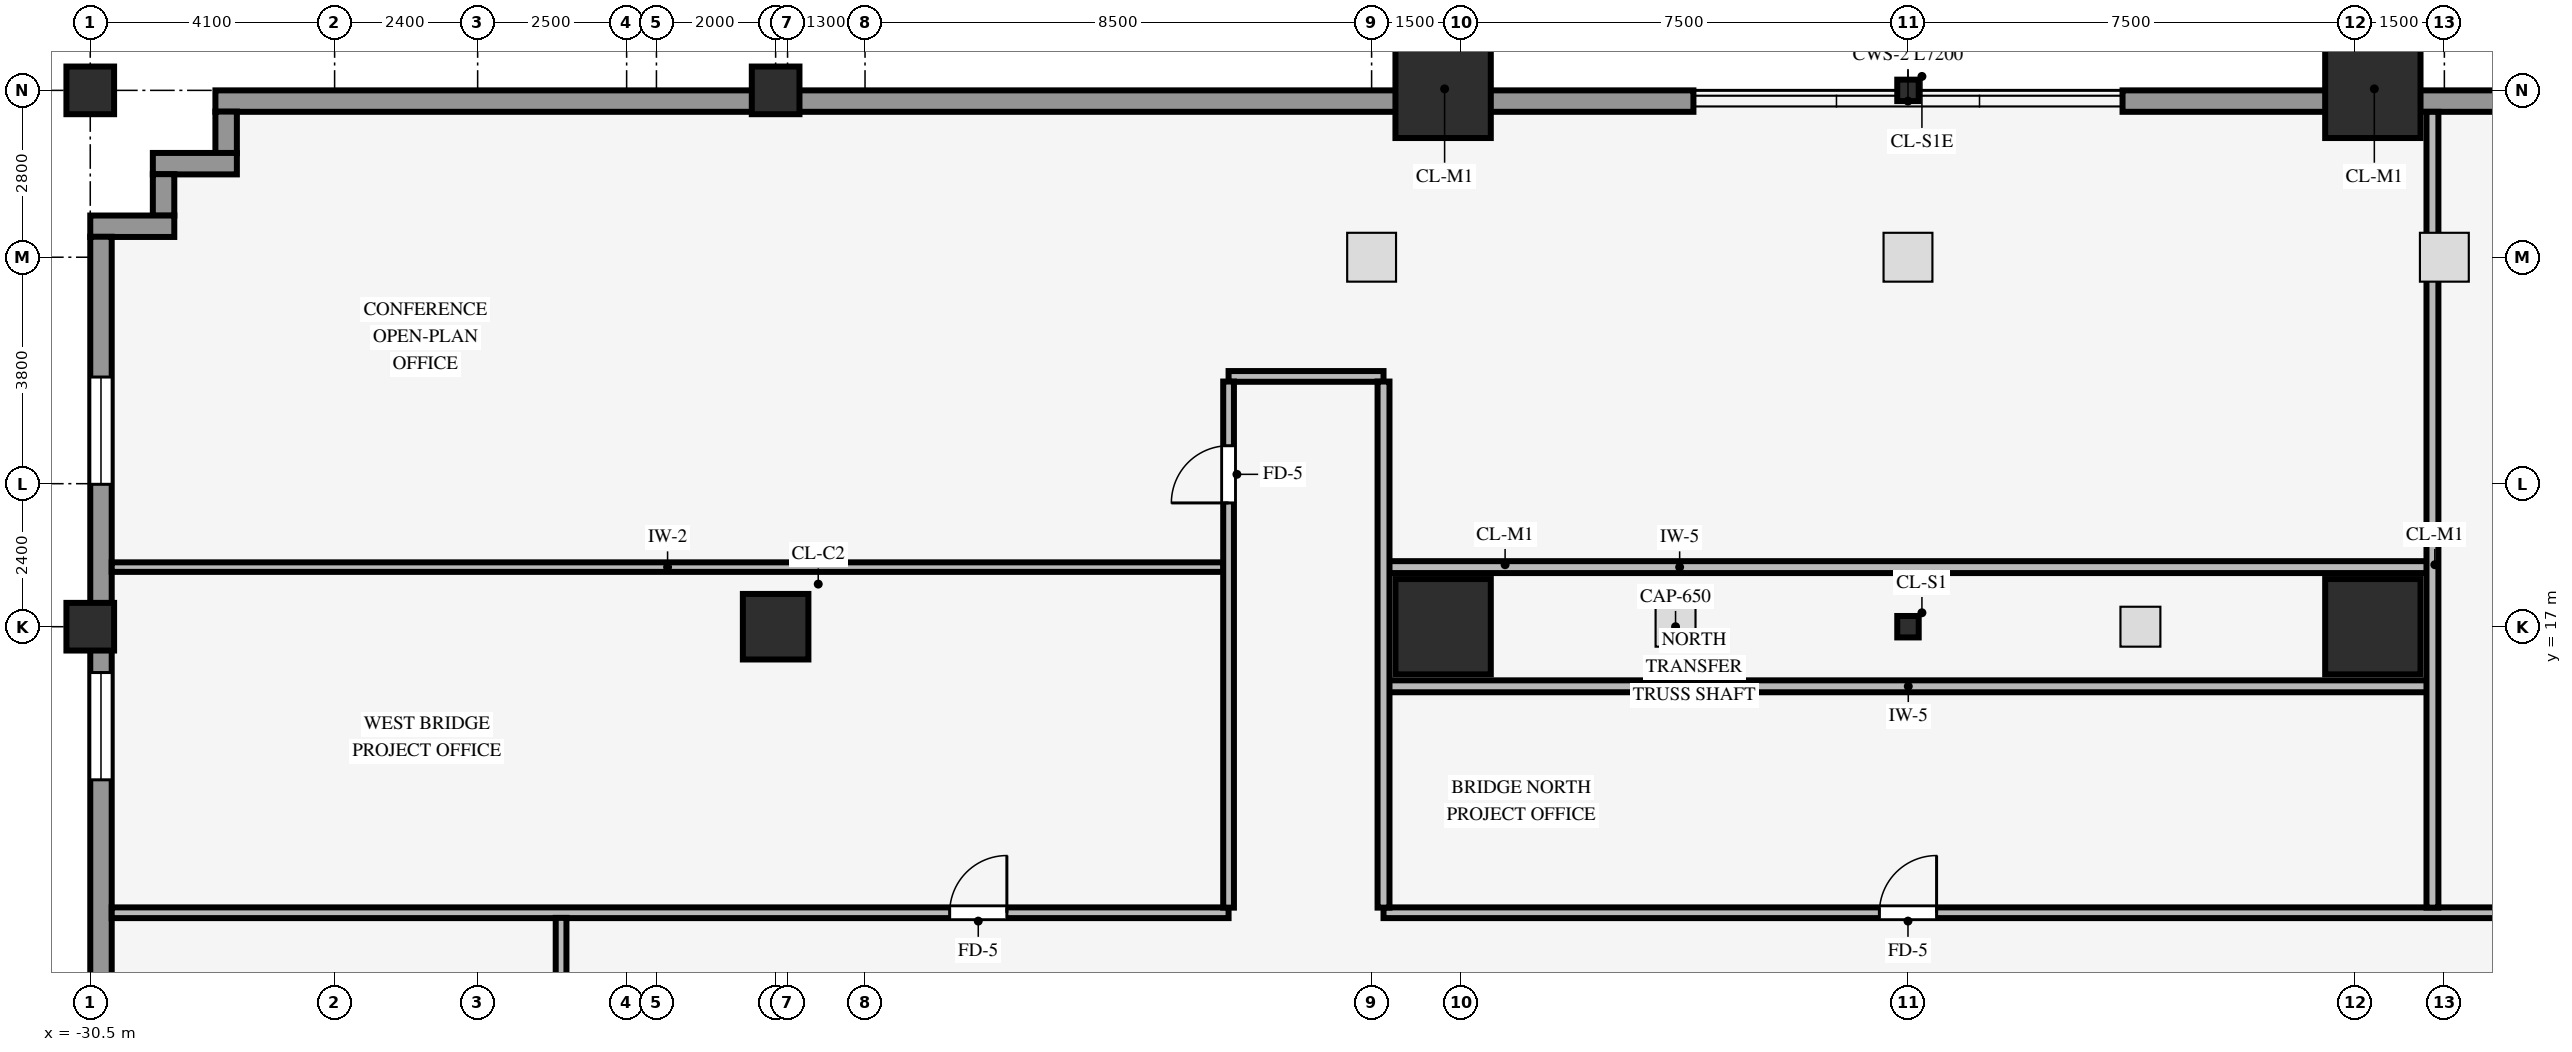
"""IFC4 building model, lengths in metres.
Left out: names, types, materials, properties, quantities, classifications, styles, units other than length and angle.
Written with IfcOpenShell. Run it as: python <this file> out.ifc"""

import sys

from ifc_helpers import new_model, si_unit, direction, frame, frame_2d, origin, origin_2d, place, context, subcontext, project, spatial, rectangle, hollow_rectangle, i_section, extrude, source, transform, mapped, element, fill, save


model = new_model("IFC4")
c1 = context("Model", 3, precision=1e-05, world=origin(), true_north=direction((0.0, 1.0)))
c2 = subcontext(c1, "Body", "Model", "MODEL_VIEW")
j1 = project(units=[si_unit("LENGTHUNIT", "METRE"), si_unit("PLANEANGLEUNIT", "RADIAN")], contexts=[c1])
p1 = place(None, origin())
s1 = spatial("IfcSite", under=j1, at=p1, CompositionType="ELEMENT")
p2 = place(p1, origin())
s2 = spatial("IfcBuilding", under=s1, at=p2, CompositionType="ELEMENT")
p3 = place(p2, frame((0.0, 0.0, 23.0)))
s3 = spatial("IfcBuildingStorey", under=s2, at=p3, CompositionType="ELEMENT", Elevation=23.0)
for number, where, z_axis, x_axis in (
    (1, (-7.8, 17.0, 0.0), (0.0, 0.0, 1.0), (1.0, 0.0, 0.0)),
    (2, (-7.8, 26.0, 0.0), (0.0, 0.0, 1.0), (1.0, 0.0, 0.0)),
    (3, (7.8, 17.0, 0.0), (0.0, 0.0, 1.0), (1.0, 0.0, 0.0)),
    (4, (7.8, 26.0, 0.0), (0.0, 0.0, 1.0), (1.0, 0.0, 0.0)),
):
    element("IfcColumn", number, at=place(p3, frame(where, z_axis=z_axis, x_axis=x_axis)), inside=s3, PredefinedType="COLUMN", context=c2, shape_type="SweptSolid", body=[
        extrude(rectangle(XDim=1.6, YDim=1.6, at=origin_2d()), origin(), (0.0, 0.0, 1.0), 4.2),
    ])
p4 = place(p3, frame((-30.5, 17.0, 0.0), z_axis=(0.0, 0.0, 1.0), x_axis=(1.0, 0.0, 0.0)))
e5 = element("IfcColumn", 5, at=p4, inside=s3, PredefinedType="COLUMN", context=c2, shape_type="SweptSolid", body=[
    extrude(hollow_rectangle(XDim=0.8, YDim=0.8, WallThickness=0.055, InnerFilletRadius=0.055, OuterFilletRadius=0.11, at=origin_2d()), origin(), (0.0, 0.0, 1.0), 4.2),
])
p5 = place(p3, frame((-30.5, 26.0, -0.4), z_axis=(0.0, 0.0, 1.0), x_axis=(1.0, 0.0, 0.0)))
e6 = element("IfcColumn", 6, at=p5, inside=s3, PredefinedType="COLUMN", context=c2, shape_type="SweptSolid", body=[
    extrude(hollow_rectangle(XDim=0.8, YDim=0.8, WallThickness=0.055, InnerFilletRadius=0.055, OuterFilletRadius=0.11, at=origin_2d()), origin(), (0.0, 0.0, 1.0), 4.6),
])
p6 = place(p3, frame((-19.0, 17.0, 0.0), z_axis=(0.0, 0.0, 1.0), x_axis=(1.0, 0.0, 0.0)))
e7 = element("IfcColumn", 7, at=p6, inside=s3, PredefinedType="COLUMN", context=c2, shape_type="SweptSolid", body=[
    extrude(rectangle(XDim=1.1, YDim=1.1, at=origin_2d()), origin(), (0.0, 0.0, 1.0), 4.2),
])
p7 = place(p3, frame((-19.0, 26.0, 0.0), z_axis=(0.0, 0.0, 1.0), x_axis=(1.0, 0.0, 0.0)))
e8 = element("IfcColumn", 8, at=p7, inside=s3, PredefinedType="COLUMN", context=c2, shape_type="SweptSolid", body=[
    extrude(hollow_rectangle(XDim=0.8, YDim=0.8, WallThickness=0.055, InnerFilletRadius=0.055, OuterFilletRadius=0.11, at=origin_2d()), origin(), (0.0, 0.0, 1.0), 4.2),
])
for number, where, z_axis, x_axis in (
    (9, (0.0, 17.0, 0.0), (0.0, 0.0, 1.0), (1.0, 0.0, 0.0)),
    (10, (0.0, 26.0, 0.0), (0.0, 0.0, 1.0), (1.0, 0.0, 0.0)),
):
    element("IfcColumn", number, at=place(p3, frame(where, z_axis=z_axis, x_axis=x_axis)), inside=s3, PredefinedType="COLUMN", context=c2, shape_type="SweptSolid", body=[
        extrude(i_section(OverallWidth=0.36, OverallDepth=0.36, WebThickness=0.021, FlangeThickness=0.021, FilletRadius=0.018, at=origin_2d()), origin(), (0.0, 0.0, 1.0), 4.2),
    ])
for number, where, z_axis, x_axis in (
    (11, (-28.4, 25.82, 0.0), (0.0, 0.0, 1.0), (1.0, 0.0, 0.0)),
    (12, (3.6, 25.82, 0.0), (0.0, 0.0, 1.0), (1.0, 0.0, 0.0)),
):
    element("IfcWall", number, at=place(p3, frame(where, z_axis=z_axis, x_axis=x_axis)), inside=s3, PredefinedType="STANDARD", context=c2, shape_type="SweptSolid", body=[
        extrude(rectangle(XDim=24.8, YDim=0.36, at=frame_2d((12.4, 0.0))), origin(), (0.0, 0.0, 1.0), 2.785),
    ])
p8 = place(p3, frame((-28.22, 24.946, 0.0), z_axis=(0.0, 0.0, 1.0), x_axis=(0.0, 1.0, 0.0)))
e13 = element("IfcWall", 13, at=p8, inside=s3, PredefinedType="STANDARD", context=c2, shape_type="SweptSolid", body=[
    extrude(rectangle(XDim=0.698, YDim=0.36, at=frame_2d((0.349, 0.0))), origin(), (0.0, 0.0, 1.0), 4.19),
])
p9 = place(p3, frame((-29.45, 24.77, 0.0), z_axis=(0.0, 0.0, 1.0), x_axis=(1.0, 0.0, 0.0)))
e14 = element("IfcWall", 14, at=p9, inside=s3, PredefinedType="STANDARD", context=c2, shape_type="SweptSolid", body=[
    extrude(rectangle(XDim=1.41, YDim=0.36, at=frame_2d((0.705, 0.0))), origin(), (0.0, 0.0, 1.0), 4.19),
])
p10 = place(p3, frame((-29.27, 23.896, 0.0), z_axis=(0.0, 0.0, 1.0), x_axis=(0.0, 1.0, 0.0)))
e15 = element("IfcWall", 15, at=p10, inside=s3, PredefinedType="STANDARD", context=c2, shape_type="SweptSolid", body=[
    extrude(rectangle(XDim=0.698, YDim=0.36, at=frame_2d((0.349, 0.0))), origin(), (0.0, 0.0, 1.0), 4.19),
])
p11 = place(p3, frame((-30.5, 23.72, 0.0), z_axis=(0.0, 0.0, 1.0), x_axis=(1.0, 0.0, 0.0)))
e16 = element("IfcWall", 16, at=p11, inside=s3, PredefinedType="STANDARD", context=c2, shape_type="SweptSolid", body=[
    extrude(rectangle(XDim=1.41, YDim=0.36, at=frame_2d((0.705, 0.0))), origin(), (0.0, 0.0, 1.0), 4.19),
])
p12 = place(p3, frame((-30.32, -23.544, 0.0), z_axis=(0.0, 0.0, 1.0), x_axis=(0.0, 1.0, 0.0)))
e17 = element("IfcWall", 17, at=p12, inside=s3, PredefinedType="STANDARD", context=c2, shape_type="SweptSolid", body=[
    extrude(rectangle(XDim=47.088, YDim=0.36, at=frame_2d((23.544, 0.0))), origin(), (0.0, 0.0, 1.0), 3.702),
])
p13 = place(p12, frame((2.354, 0.0, 0.85)))
e18 = element("IfcOpeningElement", 18, at=p13, cuts=e17, PredefinedType="OPENING", context=c2, shape_type="SweptSolid", body=[
    extrude(rectangle(XDim=1.8, YDim=2.35, at=frame_2d((0.9, 1.175))), frame((0.0, 0.19, 0.0), z_axis=(0.0, -1.0, 0.0), x_axis=(1.0, 0.0, 0.0)), (0.0, 0.0, 1.0), 0.38),
])
p14 = place(p12, frame((7.313, 0.0, 0.85)))
e19 = element("IfcOpeningElement", 19, at=p14, cuts=e17, PredefinedType="OPENING", context=c2, shape_type="SweptSolid", body=[
    extrude(rectangle(XDim=1.8, YDim=2.35, at=frame_2d((0.9, 1.175))), frame((0.0, 0.19, 0.0), z_axis=(0.0, -1.0, 0.0), x_axis=(1.0, 0.0, 0.0)), (0.0, 0.0, 1.0), 0.38),
])
p15 = place(p12, frame((15.881, 0.0, 0.85)))
e20 = element("IfcOpeningElement", 20, at=p15, cuts=e17, PredefinedType="OPENING", context=c2, shape_type="SweptSolid", body=[
    extrude(rectangle(XDim=1.8, YDim=2.35, at=frame_2d((0.9, 1.175))), frame((0.0, 0.19, 0.0), z_axis=(0.0, -1.0, 0.0), x_axis=(1.0, 0.0, 0.0)), (0.0, 0.0, 1.0), 0.38),
])
p16 = place(p12, frame((20.39, 0.0, 0.85)))
e21 = element("IfcOpeningElement", 21, at=p16, cuts=e17, PredefinedType="OPENING", context=c2, shape_type="SweptSolid", body=[
    extrude(rectangle(XDim=1.8, YDim=2.35, at=frame_2d((0.9, 1.175))), frame((0.0, 0.19, 0.0), z_axis=(0.0, -1.0, 0.0), x_axis=(1.0, 0.0, 0.0)), (0.0, 0.0, 1.0), 0.38),
])
p17 = place(p12, frame((24.898, 0.0, 0.85)))
e22 = element("IfcOpeningElement", 22, at=p17, cuts=e17, PredefinedType="OPENING", context=c2, shape_type="SweptSolid", body=[
    extrude(rectangle(XDim=1.8, YDim=2.35, at=frame_2d((0.9, 1.175))), frame((0.0, 0.19, 0.0), z_axis=(0.0, -1.0, 0.0), x_axis=(1.0, 0.0, 0.0)), (0.0, 0.0, 1.0), 0.38),
])
p18 = place(p12, frame((29.407, 0.0, 0.85)))
e23 = element("IfcOpeningElement", 23, at=p18, cuts=e17, PredefinedType="OPENING", context=c2, shape_type="SweptSolid", body=[
    extrude(rectangle(XDim=1.8, YDim=2.35, at=frame_2d((0.9, 1.175))), frame((0.0, 0.19, 0.0), z_axis=(0.0, -1.0, 0.0), x_axis=(1.0, 0.0, 0.0)), (0.0, 0.0, 1.0), 0.38),
])
p19 = place(p12, frame((37.975, 0.0, 0.85)))
e24 = element("IfcOpeningElement", 24, at=p19, cuts=e17, PredefinedType="OPENING", context=c2, shape_type="SweptSolid", body=[
    extrude(rectangle(XDim=1.8, YDim=2.35, at=frame_2d((0.9, 1.175))), frame((0.0, 0.19, 0.0), z_axis=(0.0, -1.0, 0.0), x_axis=(1.0, 0.0, 0.0)), (0.0, 0.0, 1.0), 0.38),
])
p20 = place(p12, frame((42.934, 0.0, 0.85)))
e25 = element("IfcOpeningElement", 25, at=p20, cuts=e17, PredefinedType="OPENING", context=c2, shape_type="SweptSolid", body=[
    extrude(rectangle(XDim=1.8, YDim=2.35, at=frame_2d((0.9, 1.175))), frame((0.0, 0.19, 0.0), z_axis=(0.0, -1.0, 0.0), x_axis=(1.0, 0.0, 0.0)), (0.0, 0.0, 1.0), 0.38),
])
p21 = place(p3, frame((-30.14, 12.2, 0.0), z_axis=(0.0, 0.0, 1.0), x_axis=(1.0, 0.0, 0.0)))
e26 = element("IfcWall", 26, at=p21, inside=s3, PredefinedType="PARTITIONING", context=c2, shape_type="SweptSolid", body=[
    extrude(rectangle(XDim=18.74, YDim=0.18, at=frame_2d((9.37, 0.0))), origin(), (0.0, 0.0, 1.0), 4.19),
])
p22 = place(p21, frame((14.06, 0.0, 0.0)))
e27 = element("IfcOpeningElement", 27, at=p22, cuts=e26, PredefinedType="OPENING", context=c2, shape_type="SweptSolid", body=[
    extrude(rectangle(XDim=0.96, YDim=2.1, at=frame_2d((0.48, 1.05))), frame((0.0, 0.1, 0.0), z_axis=(0.0, -1.0, 0.0), x_axis=(1.0, 0.0, 0.0)), (0.0, 0.0, 1.0), 0.2),
])
p23 = place(p3, frame((-8.8, 12.2, 0.0), z_axis=(0.0, 0.0, 1.0), x_axis=(1.0, 0.0, 0.0)))
e28 = element("IfcWall", 28, at=p23, inside=s3, PredefinedType="PARTITIONING", context=c2, shape_type="SweptSolid", body=[
    extrude(rectangle(XDim=28.6, YDim=0.18, at=frame_2d((14.3, 0.0))), origin(), (0.0, 0.0, 1.0), 4.19),
])
p24 = place(p23, frame((8.32, 0.0, 0.0)))
e29 = element("IfcOpeningElement", 29, at=p24, cuts=e28, PredefinedType="OPENING", context=c2, shape_type="SweptSolid", body=[
    extrude(rectangle(XDim=0.96, YDim=2.1, at=frame_2d((0.48, 1.05))), frame((0.0, 0.1, 0.0), z_axis=(0.0, -1.0, 0.0), x_axis=(1.0, 0.0, 0.0)), (0.0, 0.0, 1.0), 0.2),
])
p25 = place(p3, frame((-8.714, 16.0, 0.0), z_axis=(0.0, 0.0, 1.0), x_axis=(1.0, 0.0, 0.0)))
e30 = element("IfcWall", 30, at=p25, inside=s3, PredefinedType="STANDARD", context=c2, shape_type="SweptSolid", body=[
    extrude(rectangle(XDim=17.438, YDim=0.2, at=frame_2d((8.719, 0.0))), origin(), (0.0, 0.0, 1.0), 4.19),
])
p26 = place(p3, frame((-30.14, 18.0, 0.0), z_axis=(0.0, 0.0, 1.0), x_axis=(1.0, 0.0, 0.0)))
e31 = element("IfcWall", 31, at=p26, inside=s3, PredefinedType="PARTITIONING", context=c2, shape_type="SweptSolid", body=[
    extrude(rectangle(XDim=18.654, YDim=0.16, at=frame_2d((9.327, 0.0))), origin(), (0.0, 0.0, 1.0), 4.19),
])
p27 = place(p3, frame((-8.714, 18.0, 0.0), z_axis=(0.0, 0.0, 1.0), x_axis=(1.0, 0.0, 0.0)))
e32 = element("IfcWall", 32, at=p27, inside=s3, PredefinedType="STANDARD", context=c2, shape_type="SweptSolid", body=[
    extrude(rectangle(XDim=17.438, YDim=0.2, at=frame_2d((8.719, 0.0))), origin(), (0.0, 0.0, 1.0), 4.19),
])
p28 = place(p3, frame((-11.4, 21.2, 0.0), z_axis=(0.0, 0.0, 1.0), x_axis=(1.0, 0.0, 0.0)))
e33 = element("IfcWall", 33, at=p28, inside=s3, PredefinedType="PARTITIONING", context=c2, shape_type="SweptSolid", body=[
    extrude(rectangle(XDim=2.6, YDim=0.18, at=frame_2d((1.3, 0.0))), origin(), (0.0, 0.0, 1.0), 4.19),
])
p29 = place(p3, frame((-22.6, -12.114, 0.0), z_axis=(0.0, 0.0, 1.0), x_axis=(0.0, 1.0, 0.0)))
e34 = element("IfcWall", 34, at=p29, inside=s3, PredefinedType="PARTITIONING", context=c2, shape_type="SweptSolid", body=[
    extrude(rectangle(XDim=24.228, YDim=0.18, at=frame_2d((12.114, 0.0))), origin(), (0.0, 0.0, 1.0), 4.19),
])
p30 = place(p29, frame((11.634, 0.0, 0.0)))
e35 = element("IfcOpeningElement", 35, at=p30, cuts=e34, PredefinedType="OPENING", context=c2, shape_type="SweptSolid", body=[
    extrude(rectangle(XDim=0.96, YDim=2.1, at=frame_2d((0.48, 1.05))), frame((0.0, 0.1, 0.0), z_axis=(0.0, -1.0, 0.0), x_axis=(1.0, 0.0, 0.0)), (0.0, 0.0, 1.0), 0.2),
])
p31 = place(p3, frame((-11.4, 12.286, 0.0), z_axis=(0.0, 0.0, 1.0), x_axis=(0.0, 1.0, 0.0)))
e36 = element("IfcWall", 36, at=p31, inside=s3, PredefinedType="PARTITIONING", context=c2, shape_type="SweptSolid", body=[
    extrude(rectangle(XDim=8.828, YDim=0.18, at=frame_2d((4.414, 0.0))), origin(), (0.0, 0.0, 1.0), 4.19),
])
p32 = place(p31, frame((6.791, 0.0, 0.0)))
e37 = element("IfcOpeningElement", 37, at=p32, cuts=e36, PredefinedType="OPENING", context=c2, shape_type="SweptSolid", body=[
    extrude(rectangle(XDim=0.96, YDim=2.1, at=frame_2d((0.48, 1.05))), frame((0.0, 0.1, 0.0), z_axis=(0.0, -1.0, 0.0), x_axis=(1.0, 0.0, 0.0)), (0.0, 0.0, 1.0), 0.2),
])
p33 = place(p3, frame((-8.8, 12.286, 0.0), z_axis=(0.0, 0.0, 1.0), x_axis=(0.0, 1.0, 0.0)))
e38 = element("IfcWall", 38, at=p33, inside=s3, PredefinedType="STANDARD", context=c2, shape_type="SweptSolid", body=[
    extrude(rectangle(XDim=8.828, YDim=0.2, at=frame_2d((4.414, 0.0))), origin(), (0.0, 0.0, 1.0), 2.785),
])
p34 = place(p3, frame((8.8, 12.286, 0.0), z_axis=(0.0, 0.0, 1.0), x_axis=(0.0, 1.0, 0.0)))
e39 = element("IfcWall", 39, at=p34, inside=s3, PredefinedType="STANDARD", context=c2, shape_type="SweptSolid", body=[
    extrude(rectangle(XDim=13.354, YDim=0.2, at=frame_2d((6.677, 0.0))), origin(), (0.0, 0.0, 1.0), 2.785),
])
m1 = source(origin(), c2, "Body", "SweptSolid", [
    extrude(rectangle(XDim=1.8, YDim=2.35, at=frame_2d((0.9, 1.175))), frame((0.0, 0.03, 0.0), z_axis=(0.0, -1.0, 0.0), x_axis=(1.0, 0.0, 0.0)), (0.0, 0.0, 1.0), 0.06),
])
p35 = place(p19, origin())
e40 = element("IfcWindow", 40, at=p35, inside=s3, PartitioningType="SINGLE_PANEL", PredefinedType="WINDOW", context=c2, shape_type="MappedRepresentation", body=[
    mapped(m1, transform((0.0, 0.0, 0.0), scale=1.0)),
])
fill(e24, e40)
p36 = place(p20, origin())
e41 = element("IfcWindow", 41, at=p36, inside=s3, PartitioningType="SINGLE_PANEL", PredefinedType="WINDOW", context=c2, shape_type="MappedRepresentation", body=[
    mapped(m1, transform((0.0, 0.0, 0.0), scale=1.0)),
])
fill(e25, e41)
m2 = source(origin(), c2, "Body", "SweptSolid", [
    extrude(rectangle(XDim=0.96, YDim=2.1, at=frame_2d((0.48, 1.05))), frame((0.0, 0.025, 0.0), z_axis=(0.0, -1.0, 0.0), x_axis=(1.0, 0.0, 0.0)), (0.0, 0.0, 1.0), 0.05),
])
p37 = place(p24, origin())
e42 = element("IfcDoor", 42, at=p37, inside=s3, OperationType="SINGLE_SWING_RIGHT", PredefinedType="DOOR", context=c2, shape_type="MappedRepresentation", body=[
    mapped(m2, transform((0.0, 0.0, 0.0), scale=1.0)),
])
fill(e29, e42)
p38 = place(p22, origin())
e43 = element("IfcDoor", 43, at=p38, inside=s3, OperationType="SINGLE_SWING_RIGHT", PredefinedType="DOOR", context=c2, shape_type="MappedRepresentation", body=[
    mapped(m2, transform((0.0, 0.0, 0.0), scale=1.0)),
])
fill(e27, e43)
p39 = place(p32, origin())
e44 = element("IfcDoor", 44, at=p39, inside=s3, OperationType="SINGLE_SWING_LEFT", PredefinedType="DOOR", context=c2, shape_type="MappedRepresentation", body=[
    mapped(m2, transform((0.0, 0.0, 0.0), scale=1.0)),
])
fill(e37, e44)
save(model, sys.argv[1])
